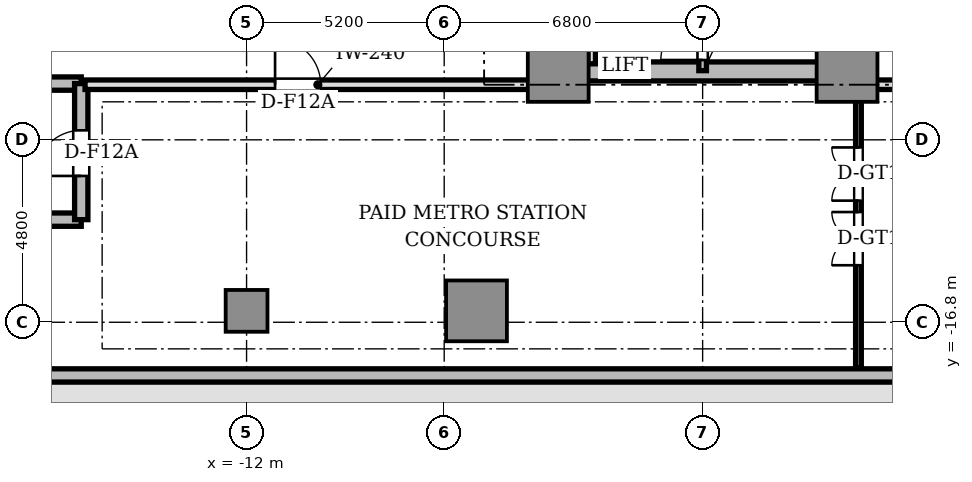
"""IFC4 building model, lengths in metres.
Left out: names, types, materials, properties, quantities, classifications, styles, units other than length and angle.
Written with IfcOpenShell. Run it as: python <this file> out.ifc"""

import sys

from ifc_helpers import new_model, si_unit, direction, frame, frame_2d, origin, origin_2d, place, context, subcontext, project, spatial, rectangle, circle, extrude, source, transform, mapped, element, fill, save


model = new_model("IFC4")
c1 = context("Model", 3, precision=1e-05, world=origin(), true_north=direction((0.0, 1.0)))
c2 = subcontext(c1, "Body", "Model", "MODEL_VIEW")
j1 = project(units=[si_unit("LENGTHUNIT", "METRE"), si_unit("PLANEANGLEUNIT", "RADIAN")], contexts=[c1])
p1 = place(None, origin())
s1 = spatial("IfcSite", under=j1, at=p1, CompositionType="ELEMENT")
p2 = place(p1, origin())
s2 = spatial("IfcBuilding", under=s1, at=p2, CompositionType="ELEMENT")
p3 = place(p2, frame((0.0, 0.0, -4.5)))
s3 = spatial("IfcBuildingStorey", under=s2, at=p3, CompositionType="ELEMENT", Elevation=-4.5)
p4 = place(p3, frame((-3.55, -10.2, 0.0), z_axis=(0.0, 0.0, 1.0), x_axis=(1.0, 0.0, 0.0)))
e1 = element("IfcWall", 1, at=p4, inside=s3, PredefinedType="SHEAR", context=c2, shape_type="SweptSolid", body=[
    extrude(rectangle(XDim=7.1, YDim=0.5, at=frame_2d((3.55, 0.0))), origin(), (0.0, 0.0, 1.0), 4.1),
])
p5 = place(p3, frame((3.8, -9.75, 0.0), z_axis=(0.0, 0.0, 1.0), x_axis=(0.0, 1.0, 0.0)))
e2 = element("IfcWall", 2, at=p5, inside=s3, PredefinedType="SHEAR", context=c2, shape_type="SweptSolid", body=[
    extrude(rectangle(XDim=6.9, YDim=0.5, at=frame_2d((3.45, 0.0))), origin(), (0.0, 0.0, 1.0), 4.1),
])
m1 = source(origin(), c2, "Body", "SweptSolid", [
    extrude(rectangle(XDim=1.6, YDim=1.6, at=origin_2d()), origin(), (0.0, 0.0, 1.0), 4.1),
])
for number, where, z_axis, x_axis in (
    (3, (-3.8, -10.2, 0.0), (0.0, 0.0, 1.0), (1.0, 0.0, 0.0)),
    (4, (3.8, -10.2, 0.0), (0.0, 0.0, 1.0), (1.0, 0.0, 0.0)),
    (5, (-5.95, -16.5, 0.0), (0.0, 0.0, 1.0), (1.0, 0.0, 0.0)),
):
    element("IfcColumn", number, at=place(p3, frame(where, z_axis=z_axis, x_axis=x_axis)), inside=s3, PredefinedType="COLUMN", context=c2, shape_type="MappedRepresentation", body=[
        mapped(m1, transform((0.0, 0.0, 0.0), scale=1.0)),
    ])
m2 = source(origin(), c2, "Body", "SweptSolid", [
    extrude(circle(Radius=0.55, at=origin_2d()), origin(), (0.0, 0.0, 1.0), 4.1),
])
p6 = place(p3, frame((-12.0, -16.5, 0.0), z_axis=(0.0, 0.0, 1.0), x_axis=(1.0, 0.0, 0.0)))
e6 = element("IfcColumn", 6, at=p6, inside=s3, PredefinedType="COLUMN", context=c2, shape_type="MappedRepresentation", body=[
    mapped(m2, transform((0.0, 0.0, 0.0), scale=1.0)),
])
p7 = place(p3, frame((-17.8, -18.2, 0.0), z_axis=(0.0, 0.0, 1.0), x_axis=(1.0, 0.0, 0.0)))
e7 = element("IfcWall", 7, at=p7, inside=s3, PredefinedType="SHEAR", context=c2, shape_type="SweptSolid", body=[
    extrude(rectangle(XDim=35.6, YDim=0.35, at=frame_2d((17.8, 0.0))), origin(), (0.0, 0.0, 1.0), 4.22),
])
p8 = place(p3, frame((0.0, -10.18, 0.0), z_axis=(0.0, 0.0, 1.0), x_axis=(0.0, 1.0, 0.0)))
e8 = element("IfcWall", 8, at=p8, inside=s3, PredefinedType="SOLIDWALL", context=c2, shape_type="SweptSolid", body=[
    extrude(rectangle(XDim=7.68, YDim=0.2, at=frame_2d((3.84, 0.0))), origin(), (0.0, 0.0, 1.0), 4.1),
])
p9 = place(p8, frame((0.28, 0.0, 0.0)))
e9 = element("IfcOpeningElement", 9, at=p9, cuts=e8, PredefinedType="OPENING", context=c2, shape_type="SweptSolid", body=[
    extrude(rectangle(XDim=1.1, YDim=2.15, at=frame_2d((0.55, 1.075))), frame((0.0, 0.11, 0.0), z_axis=(0.0, -1.0, 0.0), x_axis=(1.0, 0.0, 0.0)), (0.0, 0.0, 1.0), 0.22),
])
p10 = place(p3, frame((-2.92, -10.0, 0.0), z_axis=(0.0, 0.0, 1.0), x_axis=(0.0, 1.0, 0.0)))
e10 = element("IfcWall", 10, at=p10, inside=s3, PredefinedType="SOLIDWALL", context=c2, shape_type="SweptSolid", body=[
    extrude(rectangle(XDim=1.44, YDim=0.2, at=frame_2d((0.72, 0.0))), origin(), (0.0, 0.0, 1.0), 3.65),
])
for number, where, z_axis, x_axis in (
    (11, (-26.6, -10.52, 0.0), (0.0, 0.0, 1.0), (1.0, 0.0, 0.0)),
    (12, (-26.6, -14.1, 0.0), (0.0, 0.0, 1.0), (1.0, 0.0, 0.0)),
):
    element("IfcWall", number, at=place(p3, frame(where, z_axis=z_axis, x_axis=x_axis)), inside=s3, PredefinedType="SHEAR", context=c2, shape_type="SweptSolid", body=[
        extrude(rectangle(XDim=10.25, YDim=0.35, at=frame_2d((5.125, 0.0))), origin(), (0.0, 0.0, 1.0), 4.1),
    ])
p11 = place(p3, frame((-16.35, -14.1, 0.0), z_axis=(0.0, 0.0, 1.0), x_axis=(0.0, 1.0, 0.0)))
e13 = element("IfcWall", 13, at=p11, inside=s3, PredefinedType="SHEAR", context=c2, shape_type="SweptSolid", body=[
    extrude(rectangle(XDim=3.58, YDim=0.35, at=frame_2d((1.79, 0.0))), origin(), (0.0, 0.0, 1.0), 4.1),
])
p12 = place(p11, frame((1.15, 0.0, 0.0)))
e14 = element("IfcOpeningElement", 14, at=p12, cuts=e13, PredefinedType="OPENING", context=c2, shape_type="SweptSolid", body=[
    extrude(rectangle(XDim=1.2, YDim=2.2, at=frame_2d((0.6, 1.1))), frame((0.0, 0.185, 0.0), z_axis=(0.0, -1.0, 0.0), x_axis=(1.0, 0.0, 0.0)), (0.0, 0.0, 1.0), 0.37),
])
p13 = place(p3, frame((-16.25, -10.55, 0.0), z_axis=(0.0, 0.0, 1.0), x_axis=(1.0, 0.0, 0.0)))
e15 = element("IfcWall", 15, at=p13, inside=s3, PredefinedType="SOLIDWALL", context=c2, shape_type="SweptSolid", body=[
    extrude(rectangle(XDim=12.25, YDim=0.25, at=frame_2d((6.125, 0.0))), origin(), (0.0, 0.0, 1.0), 3.65),
])
p14 = place(p13, frame((5.0, 0.0, 0.0)))
e16 = element("IfcOpeningElement", 16, at=p14, cuts=e15, PredefinedType="OPENING", context=c2, shape_type="SweptSolid", body=[
    extrude(rectangle(XDim=1.2, YDim=2.2, at=frame_2d((0.6, 1.1))), frame((0.0, 0.135, 0.0), z_axis=(0.0, -1.0, 0.0), x_axis=(1.0, 0.0, 0.0)), (0.0, 0.0, 1.0), 0.27),
])
p15 = place(p3, frame((4.0, -10.55, 0.0), z_axis=(0.0, 0.0, 1.0), x_axis=(1.0, 0.0, 0.0)))
e17 = element("IfcWall", 17, at=p15, inside=s3, PredefinedType="SOLIDWALL", context=c2, shape_type="SweptSolid", body=[
    extrude(rectangle(XDim=12.25, YDim=0.25, at=frame_2d((6.125, 0.0))), origin(), (0.0, 0.0, 1.0), 3.65),
])
p16 = place(p15, frame((5.0, 0.0, 0.0)))
e18 = element("IfcOpeningElement", 18, at=p16, cuts=e17, PredefinedType="OPENING", context=c2, shape_type="SweptSolid", body=[
    extrude(rectangle(XDim=1.2, YDim=2.2, at=frame_2d((0.6, 1.1))), frame((0.0, 0.135, 0.0), z_axis=(0.0, -1.0, 0.0), x_axis=(1.0, 0.0, 0.0)), (0.0, 0.0, 1.0), 0.27),
])
p17 = place(p3, frame((4.1, -18.0, 0.0), z_axis=(0.0, 0.0, 1.0), x_axis=(0.0, 1.0, 0.0)))
e19 = element("IfcWall", 19, at=p17, inside=s3, PredefinedType="PARTITIONING", context=c2, shape_type="SweptSolid", body=[
    extrude(rectangle(XDim=7.45, YDim=0.15, at=frame_2d((3.725, 0.0))), origin(), (0.0, 0.0, 1.0), 3.57),
])
p18 = place(p17, frame((2.7, 0.0, 0.0)))
e20 = element("IfcOpeningElement", 20, at=p18, cuts=e19, PredefinedType="OPENING", context=c2, shape_type="SweptSolid", body=[
    extrude(rectangle(XDim=1.4, YDim=2.1, at=frame_2d((0.7, 1.05))), frame((0.0, 0.085, 0.0), z_axis=(0.0, -1.0, 0.0), x_axis=(1.0, 0.0, 0.0)), (0.0, 0.0, 1.0), 0.17),
])
p19 = place(p17, frame((4.4, 0.0, 0.0)))
e21 = element("IfcOpeningElement", 21, at=p19, cuts=e19, PredefinedType="OPENING", context=c2, shape_type="SweptSolid", body=[
    extrude(rectangle(XDim=1.4, YDim=2.1, at=frame_2d((0.7, 1.05))), frame((0.0, 0.085, 0.0), z_axis=(0.0, -1.0, 0.0), x_axis=(1.0, 0.0, 0.0)), (0.0, 0.0, 1.0), 0.17),
])
m3 = source(origin(), c2, "Body", "SweptSolid", [
    extrude(rectangle(XDim=1.1, YDim=0.05, at=origin_2d()), origin(), (0.0, 0.0, 1.0), 2.15),
])
p20 = place(p9, frame((0.55, 0.0, 0.0)))
e22 = element("IfcDoor", 22, at=p20, inside=s3, OperationType="SINGLE_SWING_LEFT", PredefinedType="DOOR", context=c2, shape_type="MappedRepresentation", body=[
    mapped(m3, transform((0.0, 0.0, 0.0), scale=1.0)),
])
fill(e9, e22)
m4 = source(origin(), c2, "Body", "SweptSolid", [
    extrude(rectangle(XDim=1.2, YDim=0.05, at=origin_2d()), origin(), (0.0, 0.0, 1.0), 2.2),
])
p21 = place(p12, frame((0.6, 0.0, 0.0)))
e23 = element("IfcDoor", 23, at=p21, inside=s3, OperationType="SINGLE_SWING_LEFT", PredefinedType="DOOR", context=c2, shape_type="MappedRepresentation", body=[
    mapped(m4, transform((0.0, 0.0, 0.0), scale=1.0)),
])
fill(e14, e23)
p22 = place(p14, frame((0.6, 0.0, 0.0)))
e24 = element("IfcDoor", 24, at=p22, inside=s3, OperationType="SINGLE_SWING_LEFT", PredefinedType="DOOR", context=c2, shape_type="MappedRepresentation", body=[
    mapped(m4, transform((0.0, 0.0, 0.0), scale=1.0)),
])
fill(e16, e24)
m5 = source(origin(), c2, "Body", "SweptSolid", [
    extrude(rectangle(XDim=1.4, YDim=0.05, at=origin_2d()), origin(), (0.0, 0.0, 1.0), 2.1),
])
p23 = place(p18, frame((0.7, 0.0, 0.0)))
e25 = element("IfcDoor", 25, at=p23, inside=s3, OperationType="DOUBLE_DOOR_SINGLE_SWING", PredefinedType="GATE", context=c2, shape_type="MappedRepresentation", body=[
    mapped(m5, transform((0.0, 0.0, 0.0), scale=1.0)),
])
fill(e20, e25)
p24 = place(p19, frame((0.7, 0.0, 0.0)))
e26 = element("IfcDoor", 26, at=p24, inside=s3, OperationType="DOUBLE_DOOR_SINGLE_SWING", PredefinedType="GATE", context=c2, shape_type="MappedRepresentation", body=[
    mapped(m5, transform((0.0, 0.0, 0.0), scale=1.0)),
])
fill(e21, e26)
save(model, sys.argv[1])
